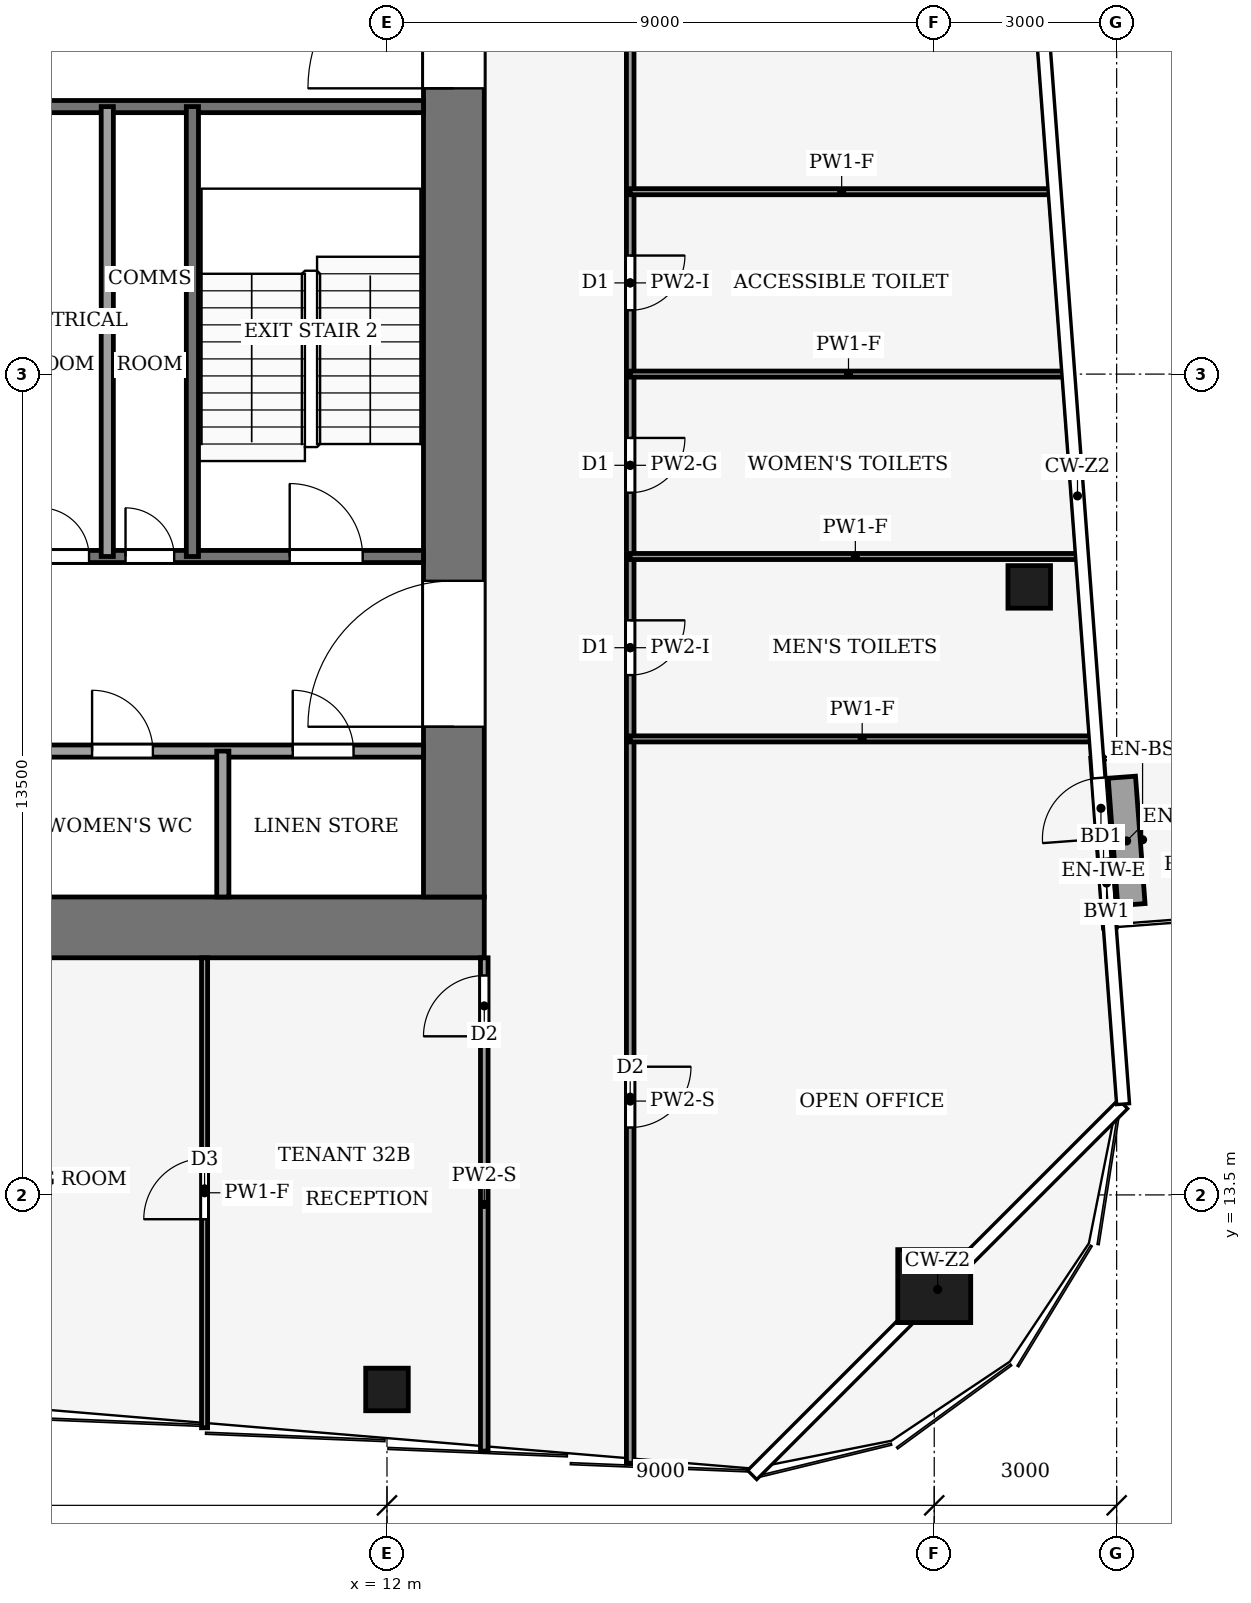
"""IFC4 building model, lengths in metres.
Left out: names, types, materials, properties, quantities, classifications, styles, units other than length and angle.
Written with IfcOpenShell. Run it as: python <this file> out.ifc"""

import sys

from ifc_helpers import new_model, si_unit, direction, frame, frame_2d, origin, origin_2d, place, context, subcontext, project, spatial, rectangle, hollow_rectangle, extrude, element, fill, save


model = new_model("IFC4")
c1 = context("Model", 3, precision=1e-05, world=origin(), true_north=direction((0.0, 1.0)))
c2 = subcontext(c1, "Body", "Model", "MODEL_VIEW")
j1 = project(units=[si_unit("LENGTHUNIT", "METRE"), si_unit("PLANEANGLEUNIT", "RADIAN")], contexts=[c1])
p1 = place(None, origin())
s1 = spatial("IfcSite", under=j1, at=p1, CompositionType="ELEMENT")
p2 = place(p1, origin())
s2 = spatial("IfcBuilding", under=s1, at=p2, CompositionType="ELEMENT")
p3 = place(p2, frame((0.0, 0.0, 142.0)))
s3 = spatial("IfcBuildingStorey", under=s2, at=p3, CompositionType="ELEMENT", Elevation=142.0)
p4 = place(p3, frame((-13.6, 17.9, -0.13), z_axis=(0.0, 0.0, 1.0), x_axis=(1.0, 0.0, 0.0)))
e1 = element("IfcWall", 1, at=p4, inside=s3, PredefinedType="SHEAR", context=c2, shape_type="SweptSolid", body=[
    extrude(rectangle(XDim=27.2, YDim=1.0, at=frame_2d((13.6, 0.0))), origin(), (0.0, 0.0, 1.0), 4.0),
])
p5 = place(p3, frame((13.1, 18.4, -0.13), z_axis=(0.0, 0.0, 1.0), x_axis=(0.0, 1.0, 0.0)))
e2 = element("IfcWall", 2, at=p5, inside=s3, PredefinedType="SHEAR", context=c2, shape_type="SweptSolid", body=[
    extrude(rectangle(XDim=19.2, YDim=1.0, at=frame_2d((9.6, 0.0))), origin(), (0.0, 0.0, 1.0), 4.0),
])
p6 = place(p5, frame((2.8, 0.0, 0.13)))
e3 = element("IfcOpeningElement", 3, at=p6, cuts=e2, PredefinedType="OPENING", context=c2, shape_type="SweptSolid", body=[
    extrude(rectangle(XDim=2.4, YDim=2.4, at=frame_2d((1.2, 1.2))), frame((0.0, 0.51, 0.0), z_axis=(0.0, -1.0, 0.0), x_axis=(1.0, 0.0, 0.0)), (0.0, 0.0, 1.0), 1.02),
])
p7 = place(p5, frame((13.3, 0.0, 0.13)))
e4 = element("IfcOpeningElement", 4, at=p7, cuts=e2, PredefinedType="OPENING", context=c2, shape_type="SweptSolid", body=[
    extrude(rectangle(XDim=2.4, YDim=2.4, at=frame_2d((1.2, 1.2))), frame((0.0, 0.51, 0.0), z_axis=(0.0, -1.0, 0.0), x_axis=(1.0, 0.0, 0.0)), (0.0, 0.0, 1.0), 1.02),
])
p8 = place(p3, frame((21.0, 12.0, 0.0), z_axis=(0.0, 0.0, 1.0), x_axis=(1.0, 0.0, 0.0)))
e5 = element("IfcColumn", 5, at=p8, inside=s3, PredefinedType="COLUMN", context=c2, shape_type="SweptSolid", body=[
    extrude(hollow_rectangle(XDim=1.2, YDim=1.2, WallThickness=0.07, at=origin_2d()), origin(), (0.0, 0.0, 1.0), 4.0),
])
for number, where, z_axis, x_axis in (
    (6, (12.0, 10.3, 0.0), (0.0, 0.0, 1.0), (1.0, 0.0, 0.0)),
    (7, (22.562, 23.5, 0.0), (0.0, 0.0, 1.0), (1.0, 0.0, 0.0)),
):
    element("IfcColumn", number, at=place(p3, frame(where, z_axis=z_axis, x_axis=x_axis)), inside=s3, PredefinedType="COLUMN", context=c2, shape_type="SweptSolid", body=[
        extrude(hollow_rectangle(XDim=0.7, YDim=0.7, WallThickness=0.03, at=origin_2d()), origin(), (0.0, 0.0, 1.0), 4.0),
    ])
p9 = place(p3, frame((23.889, 17.897, 0.0), z_axis=(0.0, 0.0, 1.0), x_axis=(-0.07478344779, 0.997199797401, 0.0)))
e8 = element("IfcWall", 8, at=p9, inside=s3, PredefinedType="SOLIDWALL", context=c2, shape_type="SweptSolid", body=[
    extrude(rectangle(XDim=2.801, YDim=0.212, at=frame_2d((1.4, 0.0))), origin(), (0.0, 0.0, 1.0), 3.65),
])
p10 = place(p9, frame((1.467, 0.0, 0.0)))
e9 = element("IfcOpeningElement", 9, at=p10, cuts=e8, PredefinedType="OPENING", context=c2, shape_type="SweptSolid", body=[
    extrude(rectangle(XDim=1.0, YDim=2.1, at=frame_2d((0.5, 1.05))), frame((0.0, 0.116, 0.0), z_axis=(0.0, -1.0, 0.0), x_axis=(1.0, 0.0, 0.0)), (0.0, 0.0, 1.0), 0.232),
])
p11 = place(p9, frame((0.334, 0.0, 0.9)))
e10 = element("IfcOpeningElement", 10, at=p11, cuts=e8, PredefinedType="OPENING", context=c2, shape_type="SweptSolid", body=[
    extrude(rectangle(XDim=0.8, YDim=1.2, at=frame_2d((0.4, 0.6))), frame((0.0, 0.116, 0.0), z_axis=(0.0, -1.0, 0.0), x_axis=(1.0, 0.0, 0.0)), (0.0, 0.0, 1.0), 0.232),
])
p12 = place(p3, frame((24.243, 18.274, 0.0), z_axis=(0.0, 0.0, 1.0), x_axis=(-0.074706185882, 0.997205588528, 0.0)))
e11 = element("IfcWall", 11, at=p12, inside=s3, PredefinedType="USERDEFINED", context=c2, shape_type="SweptSolid", body=[
    extrude(rectangle(XDim=2.101, YDim=0.45, at=frame_2d((1.051, 0.0))), origin(), (0.0, 0.0, 1.0), 0.4),
])
p13 = place(p3, frame((6.0, 20.8, 0.0), z_axis=(0.0, 0.0, 1.0), x_axis=(1.0, 0.0, 0.0)))
e12 = element("IfcWall", 12, at=p13, inside=s3, PredefinedType="PARTITIONING", context=c2, shape_type="SweptSolid", body=[
    extrude(rectangle(XDim=6.6, YDim=0.2, at=frame_2d((3.3, 0.0))), origin(), (0.0, 0.0, 1.0), 3.87),
])
p14 = place(p13, frame((1.15, 0.0, 0.0)))
e13 = element("IfcOpeningElement", 13, at=p14, cuts=e12, PredefinedType="OPENING", context=c2, shape_type="SweptSolid", body=[
    extrude(rectangle(XDim=1.0, YDim=2.1, at=frame_2d((0.5, 1.05))), frame((0.0, 0.11, 0.0), z_axis=(0.0, -1.0, 0.0), x_axis=(1.0, 0.0, 0.0)), (0.0, 0.0, 1.0), 0.22),
])
p15 = place(p13, frame((4.45, 0.0, 0.0)))
e14 = element("IfcOpeningElement", 14, at=p15, cuts=e12, PredefinedType="OPENING", context=c2, shape_type="SweptSolid", body=[
    extrude(rectangle(XDim=1.0, YDim=2.1, at=frame_2d((0.5, 1.05))), frame((0.0, 0.11, 0.0), z_axis=(0.0, -1.0, 0.0), x_axis=(1.0, 0.0, 0.0)), (0.0, 0.0, 1.0), 0.22),
])
p16 = place(p3, frame((6.0, 24.0, 0.0), z_axis=(0.0, 0.0, 1.0), x_axis=(1.0, 0.0, 0.0)))
e15 = element("IfcWall", 15, at=p16, inside=s3, PredefinedType="PARTITIONING", context=c2, shape_type="SweptSolid", body=[
    extrude(rectangle(XDim=6.6, YDim=0.2, at=frame_2d((3.3, 0.0))), origin(), (0.0, 0.0, 1.0), 3.87),
])
p17 = place(p16, frame((0.3, 0.0, 0.0)))
e16 = element("IfcOpeningElement", 16, at=p17, cuts=e15, PredefinedType="OPENING", context=c2, shape_type="SweptSolid", body=[
    extrude(rectangle(XDim=0.8, YDim=2.1, at=frame_2d((0.4, 1.05))), frame((0.0, 0.11, 0.0), z_axis=(0.0, -1.0, 0.0), x_axis=(1.0, 0.0, 0.0)), (0.0, 0.0, 1.0), 0.22),
])
p18 = place(p16, frame((1.7, 0.0, 0.0)))
e17 = element("IfcOpeningElement", 17, at=p18, cuts=e15, PredefinedType="OPENING", context=c2, shape_type="SweptSolid", body=[
    extrude(rectangle(XDim=0.8, YDim=2.1, at=frame_2d((0.4, 1.05))), frame((0.0, 0.11, 0.0), z_axis=(0.0, -1.0, 0.0), x_axis=(1.0, 0.0, 0.0)), (0.0, 0.0, 1.0), 0.22),
])
p19 = place(p16, frame((4.4, 0.0, 0.0)))
e18 = element("IfcOpeningElement", 18, at=p19, cuts=e15, PredefinedType="OPENING", context=c2, shape_type="SweptSolid", body=[
    extrude(rectangle(XDim=1.2, YDim=2.2, at=frame_2d((0.6, 1.1))), frame((0.0, 0.11, 0.0), z_axis=(0.0, -1.0, 0.0), x_axis=(1.0, 0.0, 0.0)), (0.0, 0.0, 1.0), 0.22),
])
p20 = place(p3, frame((6.0, 31.4, 0.0), z_axis=(0.0, 0.0, 1.0), x_axis=(1.0, 0.0, 0.0)))
e19 = element("IfcWall", 19, at=p20, inside=s3, PredefinedType="PARTITIONING", context=c2, shape_type="SweptSolid", body=[
    extrude(rectangle(XDim=6.6, YDim=0.2, at=frame_2d((3.3, 0.0))), origin(), (0.0, 0.0, 1.0), 3.87),
])
for number, where, z_axis, x_axis in (
    (20, (7.4, 24.0, 0.0), (0.0, 0.0, 1.0), (0.0, 1.0, 0.0)),
    (21, (8.8, 24.0, 0.0), (0.0, 0.0, 1.0), (0.0, 1.0, 0.0)),
):
    element("IfcWall", number, at=place(p3, frame(where, z_axis=z_axis, x_axis=x_axis)), inside=s3, PredefinedType="PARTITIONING", context=c2, shape_type="SweptSolid", body=[
        extrude(rectangle(XDim=7.4, YDim=0.2, at=frame_2d((3.7, 0.0))), origin(), (0.0, 0.0, 1.0), 3.87),
    ])
p21 = place(p3, frame((9.3, 18.4, 0.0), z_axis=(0.0, 0.0, 1.0), x_axis=(0.0, 1.0, 0.0)))
e22 = element("IfcWall", 22, at=p21, inside=s3, PredefinedType="PARTITIONING", context=c2, shape_type="SweptSolid", body=[
    extrude(rectangle(XDim=2.4, YDim=0.2, at=frame_2d((1.2, 0.0))), origin(), (0.0, 0.0, 1.0), 3.87),
])
p22 = place(p3, frame((16.0, 21.0, 0.0), z_axis=(0.0, 0.0, 1.0), x_axis=(0.0, -1.0, 0.0)))
e23 = element("IfcWall", 23, at=p22, inside=s3, PredefinedType="PARTITIONING", context=c2, shape_type="SweptSolid", body=[
    extrude(rectangle(XDim=11.913, YDim=0.125, at=frame_2d((5.957, 0.0))), origin(), (0.0, 0.0, 1.0), 3.04),
])
p23 = place(p22, frame((5.392, 0.0, 0.0)))
e24 = element("IfcOpeningElement", 24, at=p23, cuts=e23, PredefinedType="OPENING", context=c2, shape_type="SweptSolid", body=[
    extrude(rectangle(XDim=1.0, YDim=2.1, at=frame_2d((0.5, 1.05))), frame((0.0, 0.073, 0.0), z_axis=(0.0, -1.0, 0.0), x_axis=(1.0, 0.0, 0.0)), (0.0, 0.0, 1.0), 0.145),
])
p24 = place(p3, frame((16.0, 24.0, 0.0), z_axis=(0.0, 0.0, 1.0), x_axis=(0.0, -1.0, 0.0)))
e25 = element("IfcWall", 25, at=p24, inside=s3, PredefinedType="PARTITIONING", context=c2, shape_type="SweptSolid", body=[
    extrude(rectangle(XDim=3.0, YDim=0.125, at=frame_2d((1.5, 0.0))), origin(), (0.0, 0.0, 1.0), 3.48),
])
p25 = place(p24, frame((1.05, 0.0, 0.0)))
e26 = element("IfcOpeningElement", 26, at=p25, cuts=e25, PredefinedType="OPENING", context=c2, shape_type="SweptSolid", body=[
    extrude(rectangle(XDim=0.9, YDim=2.1, at=frame_2d((0.45, 1.05))), frame((0.0, 0.073, 0.0), z_axis=(0.0, -1.0, 0.0), x_axis=(1.0, 0.0, 0.0)), (0.0, 0.0, 1.0), 0.145),
])
p26 = place(p3, frame((16.0, 27.0, 0.0), z_axis=(0.0, 0.0, 1.0), x_axis=(0.0, -1.0, 0.0)))
e27 = element("IfcWall", 27, at=p26, inside=s3, PredefinedType="PARTITIONING", context=c2, shape_type="SweptSolid", body=[
    extrude(rectangle(XDim=3.0, YDim=0.125, at=frame_2d((1.5, 0.0))), origin(), (0.0, 0.0, 1.0), 3.87),
])
p27 = place(p26, frame((1.05, 0.0, 0.0)))
e28 = element("IfcOpeningElement", 28, at=p27, cuts=e27, PredefinedType="OPENING", context=c2, shape_type="SweptSolid", body=[
    extrude(rectangle(XDim=0.9, YDim=2.1, at=frame_2d((0.45, 1.05))), frame((0.0, 0.073, 0.0), z_axis=(0.0, -1.0, 0.0), x_axis=(1.0, 0.0, 0.0)), (0.0, 0.0, 1.0), 0.145),
])
p28 = place(p3, frame((16.0, 30.0, 0.0), z_axis=(0.0, 0.0, 1.0), x_axis=(0.0, -1.0, 0.0)))
e29 = element("IfcWall", 29, at=p28, inside=s3, PredefinedType="PARTITIONING", context=c2, shape_type="SweptSolid", body=[
    extrude(rectangle(XDim=3.0, YDim=0.125, at=frame_2d((1.5, 0.0))), origin(), (0.0, 0.0, 1.0), 3.48),
])
p29 = place(p28, frame((1.05, 0.0, 0.0)))
e30 = element("IfcOpeningElement", 30, at=p29, cuts=e29, PredefinedType="OPENING", context=c2, shape_type="SweptSolid", body=[
    extrude(rectangle(XDim=0.9, YDim=2.1, at=frame_2d((0.45, 1.05))), frame((0.0, 0.073, 0.0), z_axis=(0.0, -1.0, 0.0), x_axis=(1.0, 0.0, 0.0)), (0.0, 0.0, 1.0), 0.145),
])
p30 = place(p3, frame((16.0, 41.004, 0.0), z_axis=(0.0, 0.0, 1.0), x_axis=(0.0, -1.0, 0.0)))
e31 = element("IfcWall", 31, at=p30, inside=s3, PredefinedType="PARTITIONING", context=c2, shape_type="SweptSolid", body=[
    extrude(rectangle(XDim=11.004, YDim=0.125, at=frame_2d((5.502, 0.0))), origin(), (0.0, 0.0, 1.0), 3.14),
])
p31 = place(p30, frame((5.002, 0.0, 0.0)))
e32 = element("IfcOpeningElement", 32, at=p31, cuts=e31, PredefinedType="OPENING", context=c2, shape_type="SweptSolid", body=[
    extrude(rectangle(XDim=1.0, YDim=2.1, at=frame_2d((0.5, 1.05))), frame((0.0, 0.073, 0.0), z_axis=(0.0, -1.0, 0.0), x_axis=(1.0, 0.0, 0.0)), (0.0, 0.0, 1.0), 0.145),
])
p32 = place(p3, frame((13.6, 9.287, 0.0), z_axis=(0.0, 0.0, 1.0), x_axis=(0.0, 1.0, 0.0)))
e33 = element("IfcWall", 33, at=p32, inside=s3, PredefinedType="PARTITIONING", context=c2, shape_type="SweptSolid", body=[
    extrude(rectangle(XDim=8.113, YDim=0.125, at=frame_2d((4.057, 0.0))), origin(), (0.0, 0.0, 1.0), 3.04),
])
p33 = place(p32, frame((6.822, 0.0, 0.0)))
e34 = element("IfcOpeningElement", 34, at=p33, cuts=e33, PredefinedType="OPENING", context=c2, shape_type="SweptSolid", body=[
    extrude(rectangle(XDim=1.0, YDim=2.1, at=frame_2d((0.5, 1.05))), frame((0.0, 0.073, 0.0), z_axis=(0.0, -1.0, 0.0), x_axis=(1.0, 0.0, 0.0)), (0.0, 0.0, 1.0), 0.145),
])
p34 = place(p3, frame((23.63, 21.0, 0.0), z_axis=(0.0, 0.0, 1.0), x_axis=(-1.0, 0.0, 0.0)))
e35 = element("IfcWall", 35, at=p34, inside=s3, PredefinedType="PARTITIONING", context=c2, shape_type="SweptSolid", body=[
    extrude(rectangle(XDim=7.63, YDim=0.1, at=frame_2d((3.815, 0.0))), origin(), (0.0, 0.0, 1.0), 3.04),
])
p35 = place(p3, frame((23.405, 24.0, 0.0), z_axis=(0.0, 0.0, 1.0), x_axis=(-1.0, 0.0, 0.0)))
e36 = element("IfcWall", 36, at=p35, inside=s3, PredefinedType="PARTITIONING", context=c2, shape_type="SweptSolid", body=[
    extrude(rectangle(XDim=7.405, YDim=0.1, at=frame_2d((3.703, 0.0))), origin(), (0.0, 0.0, 1.0), 3.04),
])
p36 = place(p3, frame((23.18, 27.0, 0.0), z_axis=(0.0, 0.0, 1.0), x_axis=(-1.0, 0.0, 0.0)))
e37 = element("IfcWall", 37, at=p36, inside=s3, PredefinedType="PARTITIONING", context=c2, shape_type="SweptSolid", body=[
    extrude(rectangle(XDim=7.18, YDim=0.1, at=frame_2d((3.59, 0.0))), origin(), (0.0, 0.0, 1.0), 3.04),
])
p37 = place(p3, frame((22.955, 30.0, 0.0), z_axis=(0.0, 0.0, 1.0), x_axis=(-1.0, 0.0, 0.0)))
e38 = element("IfcWall", 38, at=p37, inside=s3, PredefinedType="PARTITIONING", context=c2, shape_type="SweptSolid", body=[
    extrude(rectangle(XDim=6.955, YDim=0.1, at=frame_2d((3.478, 0.0))), origin(), (0.0, 0.0, 1.0), 3.04),
])
p38 = place(p3, frame((9.0, 9.67, 0.0), z_axis=(0.0, 0.0, 1.0), x_axis=(0.0, 1.0, 0.0)))
e39 = element("IfcWall", 39, at=p38, inside=s3, PredefinedType="PARTITIONING", context=c2, shape_type="SweptSolid", body=[
    extrude(rectangle(XDim=7.73, YDim=0.1, at=frame_2d((3.865, 0.0))), origin(), (0.0, 0.0, 1.0), 3.04),
])
p39 = place(p38, frame((3.43, 0.0, 0.0)))
e40 = element("IfcOpeningElement", 40, at=p39, cuts=e39, PredefinedType="OPENING", context=c2, shape_type="SweptSolid", body=[
    extrude(rectangle(XDim=1.0, YDim=2.1, at=frame_2d((0.5, 1.05))), frame((0.0, 0.06, 0.0), z_axis=(0.0, -1.0, 0.0), x_axis=(1.0, 0.0, 0.0)), (0.0, 0.0, 1.0), 0.12),
])
p40 = place(p10, origin())
e41 = element("IfcDoor", 41, at=p40, inside=s3, OperationType="SINGLE_SWING_RIGHT", PredefinedType="DOOR", context=c2, shape_type="SweptSolid", body=[
    extrude(rectangle(XDim=1.0, YDim=2.1, at=frame_2d((0.5, 1.05))), frame((0.0, 0.025, 0.0), z_axis=(0.0, -1.0, 0.0), x_axis=(1.0, 0.0, 0.0)), (0.0, 0.0, 1.0), 0.05),
])
fill(e9, e41)
p41 = place(p11, origin())
e42 = element("IfcWindow", 42, at=p41, inside=s3, PartitioningType="SINGLE_PANEL", PredefinedType="WINDOW", context=c2, shape_type="SweptSolid", body=[
    extrude(rectangle(XDim=0.8, YDim=1.2, at=frame_2d((0.4, 0.6))), frame((0.0, 0.03, 0.0), z_axis=(0.0, -1.0, 0.0), x_axis=(1.0, 0.0, 0.0)), (0.0, 0.0, 1.0), 0.06),
])
fill(e10, e42)
p42 = place(p14, origin())
e43 = element("IfcDoor", 43, at=p42, inside=s3, OperationType="SINGLE_SWING_LEFT", PredefinedType="DOOR", context=c2, shape_type="SweptSolid", body=[
    extrude(rectangle(XDim=1.0, YDim=2.1, at=frame_2d((0.5, 1.05))), frame((0.0, 0.025, 0.0), z_axis=(0.0, -1.0, 0.0), x_axis=(1.0, 0.0, 0.0)), (0.0, 0.0, 1.0), 0.05),
])
fill(e13, e43)
p43 = place(p15, origin())
e44 = element("IfcDoor", 44, at=p43, inside=s3, OperationType="SINGLE_SWING_LEFT", PredefinedType="DOOR", context=c2, shape_type="SweptSolid", body=[
    extrude(rectangle(XDim=1.0, YDim=2.1, at=frame_2d((0.5, 1.05))), frame((0.0, 0.025, 0.0), z_axis=(0.0, -1.0, 0.0), x_axis=(1.0, 0.0, 0.0)), (0.0, 0.0, 1.0), 0.05),
])
fill(e14, e44)
p44 = place(p17, origin())
e45 = element("IfcDoor", 45, at=p44, inside=s3, OperationType="SINGLE_SWING_RIGHT", PredefinedType="DOOR", context=c2, shape_type="SweptSolid", body=[
    extrude(rectangle(XDim=0.8, YDim=2.1, at=frame_2d((0.4, 1.05))), frame((0.0, 0.025, 0.0), z_axis=(0.0, -1.0, 0.0), x_axis=(1.0, 0.0, 0.0)), (0.0, 0.0, 1.0), 0.05),
])
fill(e16, e45)
p45 = place(p18, origin())
e46 = element("IfcDoor", 46, at=p45, inside=s3, OperationType="SINGLE_SWING_LEFT", PredefinedType="DOOR", context=c2, shape_type="SweptSolid", body=[
    extrude(rectangle(XDim=0.8, YDim=2.1, at=frame_2d((0.4, 1.05))), frame((0.0, 0.025, 0.0), z_axis=(0.0, -1.0, 0.0), x_axis=(1.0, 0.0, 0.0)), (0.0, 0.0, 1.0), 0.05),
])
fill(e17, e46)
p46 = place(p19, origin())
e47 = element("IfcDoor", 47, at=p46, inside=s3, OperationType="SINGLE_SWING_RIGHT", PredefinedType="DOOR", context=c2, shape_type="SweptSolid", body=[
    extrude(rectangle(XDim=1.2, YDim=2.2, at=frame_2d((0.6, 1.1))), frame((0.0, 0.025, 0.0), z_axis=(0.0, -1.0, 0.0), x_axis=(1.0, 0.0, 0.0)), (0.0, 0.0, 1.0), 0.05),
])
fill(e18, e47)
p47 = place(p6, origin())
e48 = element("IfcDoor", 48, at=p47, inside=s3, OperationType="DOUBLE_DOOR_SINGLE_SWING", PredefinedType="DOOR", context=c2, shape_type="SweptSolid", body=[
    extrude(rectangle(XDim=2.4, YDim=2.4, at=frame_2d((1.2, 1.2))), frame((0.0, 0.025, 0.0), z_axis=(0.0, -1.0, 0.0), x_axis=(1.0, 0.0, 0.0)), (0.0, 0.0, 1.0), 0.05),
])
fill(e3, e48)
p48 = place(p7, origin())
e49 = element("IfcDoor", 49, at=p48, inside=s3, OperationType="DOUBLE_DOOR_SINGLE_SWING", PredefinedType="DOOR", context=c2, shape_type="SweptSolid", body=[
    extrude(rectangle(XDim=2.4, YDim=2.4, at=frame_2d((1.2, 1.2))), frame((0.0, 0.025, 0.0), z_axis=(0.0, -1.0, 0.0), x_axis=(1.0, 0.0, 0.0)), (0.0, 0.0, 1.0), 0.05),
])
fill(e4, e49)
p49 = place(p23, origin())
e50 = element("IfcDoor", 50, at=p49, inside=s3, OperationType="SINGLE_SWING_LEFT", PredefinedType="DOOR", context=c2, shape_type="SweptSolid", body=[
    extrude(rectangle(XDim=1.0, YDim=2.1, at=frame_2d((0.5, 1.05))), frame((0.0, 0.025, 0.0), z_axis=(0.0, -1.0, 0.0), x_axis=(1.0, 0.0, 0.0)), (0.0, 0.0, 1.0), 0.05),
])
fill(e24, e50)
p50 = place(p25, origin())
e51 = element("IfcDoor", 51, at=p50, inside=s3, OperationType="SINGLE_SWING_LEFT", PredefinedType="DOOR", context=c2, shape_type="SweptSolid", body=[
    extrude(rectangle(XDim=0.9, YDim=2.1, at=frame_2d((0.45, 1.05))), frame((0.0, 0.025, 0.0), z_axis=(0.0, -1.0, 0.0), x_axis=(1.0, 0.0, 0.0)), (0.0, 0.0, 1.0), 0.05),
])
fill(e26, e51)
p51 = place(p27, origin())
e52 = element("IfcDoor", 52, at=p51, inside=s3, OperationType="SINGLE_SWING_RIGHT", PredefinedType="DOOR", context=c2, shape_type="SweptSolid", body=[
    extrude(rectangle(XDim=0.9, YDim=2.1, at=frame_2d((0.45, 1.05))), frame((0.0, 0.025, 0.0), z_axis=(0.0, -1.0, 0.0), x_axis=(1.0, 0.0, 0.0)), (0.0, 0.0, 1.0), 0.05),
])
fill(e28, e52)
p52 = place(p29, origin())
e53 = element("IfcDoor", 53, at=p52, inside=s3, OperationType="SINGLE_SWING_LEFT", PredefinedType="DOOR", context=c2, shape_type="SweptSolid", body=[
    extrude(rectangle(XDim=0.9, YDim=2.1, at=frame_2d((0.45, 1.05))), frame((0.0, 0.025, 0.0), z_axis=(0.0, -1.0, 0.0), x_axis=(1.0, 0.0, 0.0)), (0.0, 0.0, 1.0), 0.05),
])
fill(e30, e53)
p53 = place(p33, origin())
e54 = element("IfcDoor", 54, at=p53, inside=s3, OperationType="SINGLE_SWING_RIGHT", PredefinedType="DOOR", context=c2, shape_type="SweptSolid", body=[
    extrude(rectangle(XDim=1.0, YDim=2.1, at=frame_2d((0.5, 1.05))), frame((0.0, 0.025, 0.0), z_axis=(0.0, -1.0, 0.0), x_axis=(1.0, 0.0, 0.0)), (0.0, 0.0, 1.0), 0.05),
])
fill(e34, e54)
p54 = place(p39, origin())
e55 = element("IfcDoor", 55, at=p54, inside=s3, OperationType="SINGLE_SWING_RIGHT", PredefinedType="DOOR", context=c2, shape_type="SweptSolid", body=[
    extrude(rectangle(XDim=1.0, YDim=2.1, at=frame_2d((0.5, 1.05))), frame((0.0, 0.025, 0.0), z_axis=(0.0, -1.0, 0.0), x_axis=(1.0, 0.0, 0.0)), (0.0, 0.0, 1.0), 0.05),
])
fill(e40, e55)
save(model, sys.argv[1])
